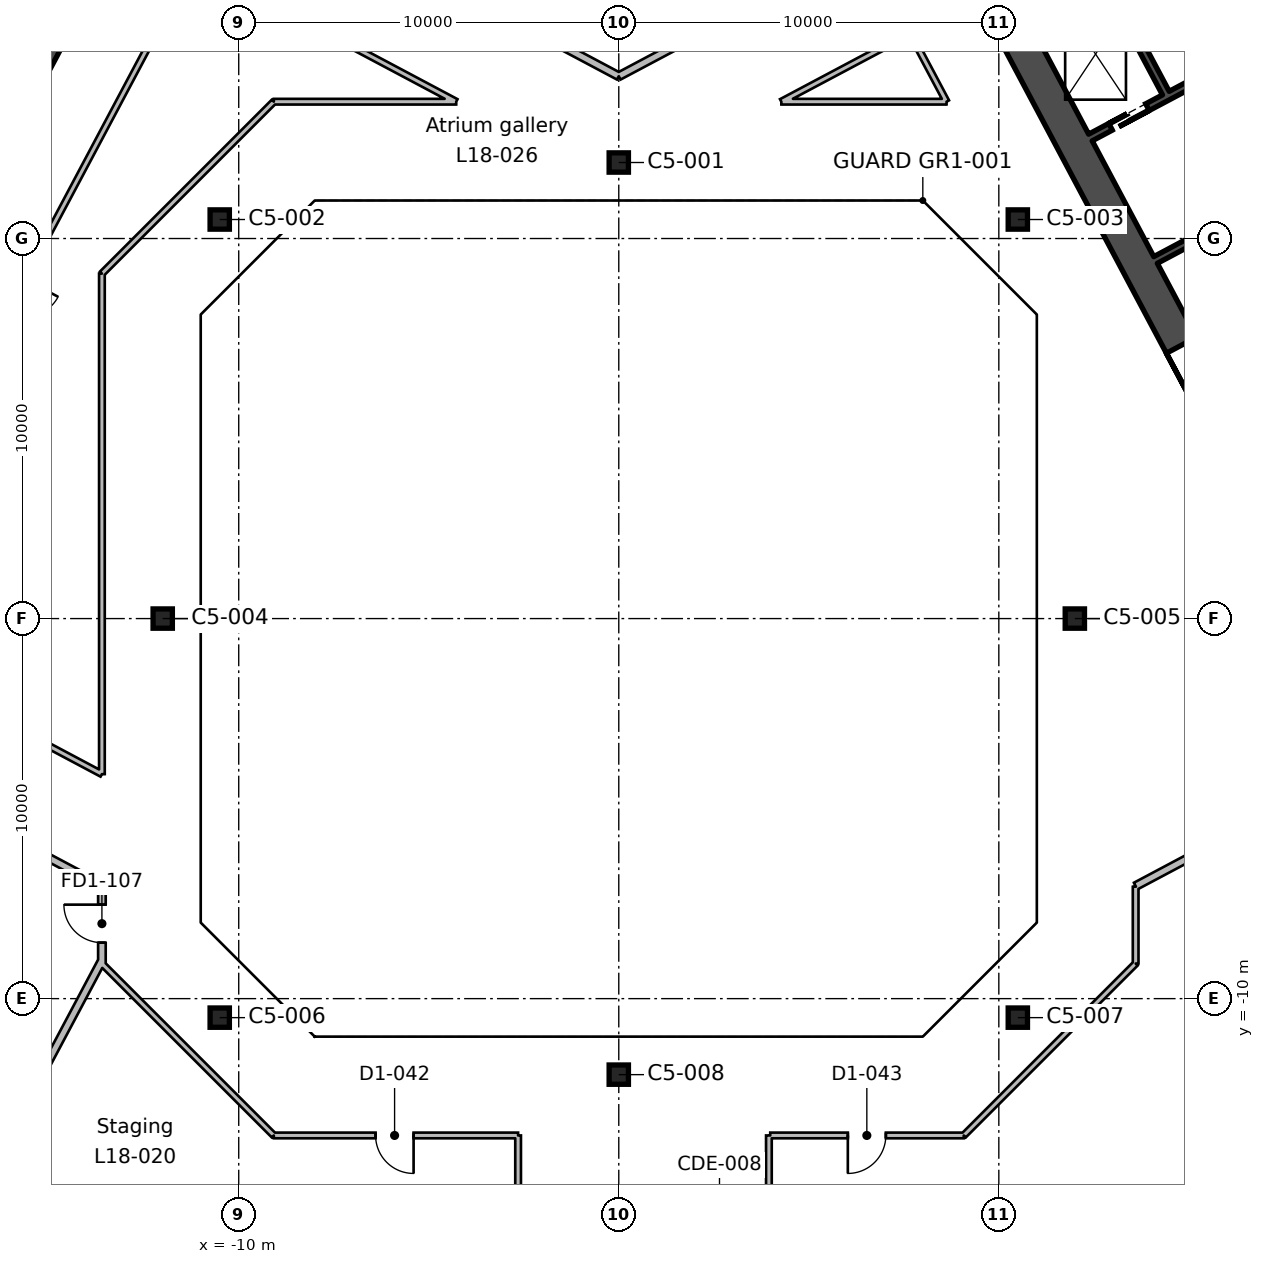
"""IFC4 building model, lengths in metres.
Left out: names, types, materials, properties, quantities, classifications, styles, units other than length and angle.
Written with IfcOpenShell. Run it as: python <this file> out.ifc"""

import sys

from ifc_helpers import new_model, si_unit, direction, frame, frame_2d, origin, origin_2d, place, context, subcontext, project, spatial, rectangle, hollow_rectangle, extrude, element, fill, save


model = new_model("IFC4")
c1 = context("Model", 3, precision=1e-05, world=origin(), true_north=direction((0.0, 1.0)))
c2 = subcontext(c1, "Body", "Model", "MODEL_VIEW")
j1 = project(units=[si_unit("LENGTHUNIT", "METRE"), si_unit("PLANEANGLEUNIT", "RADIAN")], contexts=[c1])
p1 = place(None, origin())
s1 = spatial("IfcSite", under=j1, at=p1, CompositionType="ELEMENT")
p2 = place(p1, origin())
s2 = spatial("IfcBuilding", under=s1, at=p2, CompositionType="ELEMENT")
p3 = place(p2, frame((0.0, 0.0, 93.8)))
s3 = spatial("IfcBuildingStorey", under=s2, at=p3, CompositionType="ELEMENT", Elevation=93.8)
for number, where, z_axis, x_axis in (
    (1, (0.0, -12.0, 0.0), (0.0, 0.0, 1.0), (1.0, 0.0, 0.0)),
    (2, (-10.5, -10.5, 0.0), (0.0, 0.0, 1.0), (1.0, 0.0, 0.0)),
    (3, (10.5, -10.5, 0.0), (0.0, 0.0, 1.0), (1.0, 0.0, 0.0)),
    (4, (-12.0, 0.0, 0.0), (0.0, 0.0, 1.0), (1.0, 0.0, 0.0)),
    (5, (12.0, 0.0, 0.0), (0.0, 0.0, 1.0), (1.0, 0.0, 0.0)),
    (6, (-10.5, 10.5, 0.0), (0.0, 0.0, 1.0), (1.0, 0.0, 0.0)),
    (7, (10.5, 10.5, 0.0), (0.0, 0.0, 1.0), (1.0, 0.0, 0.0)),
    (8, (0.0, 12.0, 0.0), (0.0, 0.0, 1.0), (1.0, 0.0, 0.0)),
):
    element("IfcColumn", number, at=place(p3, frame(where, z_axis=z_axis, x_axis=x_axis)), inside=s3, PredefinedType="COLUMN", context=c2, shape_type="SweptSolid", body=[
        extrude(hollow_rectangle(XDim=0.508, YDim=0.508, WallThickness=0.021, InnerFilletRadius=0.01, OuterFilletRadius=0.031, at=origin_2d()), origin(), (0.0, 0.0, 1.0), 4.6),
    ])
p4 = place(p3, frame((-13.362, 18.43, 0.0), z_axis=(0.0, 0.0, 1.0), x_axis=(-0.46947084998, -0.882947971864, 0.0)))
e9 = element("IfcWall", 9, at=p4, inside=s3, PredefinedType="SHEAR", context=c2, shape_type="SweptSolid", body=[
    extrude(rectangle(XDim=20.0, YDim=0.9, at=frame_2d((10.0, 0.0))), origin(), (0.0, 0.0, 1.0), 4.6),
])
p5 = place(p4, frame((7.0, 0.0, 0.0)))
e10 = element("IfcOpeningElement", 10, at=p5, cuts=e9, PredefinedType="OPENING", context=c2, shape_type="SweptSolid", body=[
    extrude(rectangle(XDim=2.4, YDim=2.4, at=frame_2d((1.2, 1.2))), frame((0.0, 0.46, 0.0), z_axis=(0.0, -1.0, 0.0), x_axis=(1.0, 0.0, 0.0)), (0.0, 0.0, 1.0), 0.92),
])
p6 = place(p3, frame((19.219, -1.107, 0.0), z_axis=(0.0, 0.0, 1.0), x_axis=(-0.46947084998, 0.882947971864, 0.0)))
e11 = element("IfcWall", 11, at=p6, inside=s3, PredefinedType="SHEAR", context=c2, shape_type="SweptSolid", body=[
    extrude(rectangle(XDim=20.0, YDim=0.9, at=frame_2d((10.0, 0.0))), origin(), (0.0, 0.0, 1.0), 4.6),
])
p7 = place(p6, frame((7.0, 0.0, 0.0)))
e12 = element("IfcOpeningElement", 12, at=p7, cuts=e11, PredefinedType="OPENING", context=c2, shape_type="SweptSolid", body=[
    extrude(rectangle(XDim=2.4, YDim=2.4, at=frame_2d((1.2, 1.2))), frame((0.0, 0.46, 0.0), z_axis=(0.0, -1.0, 0.0), x_axis=(1.0, 0.0, 0.0)), (0.0, 0.0, 1.0), 0.92),
])
p8 = place(p3, frame((14.394, 13.826, 0.0), z_axis=(0.0, 0.0, 1.0), x_axis=(-0.469494272526, 0.882935517501, 0.0)))
e13 = element("IfcWall", 13, at=p8, inside=s3, PredefinedType="SHEAR", context=c2, shape_type="SweptSolid", body=[
    extrude(rectangle(XDim=3.65, YDim=0.2, at=frame_2d((1.825, 0.0))), origin(), (0.0, 0.0, 1.0), 4.6),
])
p9 = place(p3, frame((18.138, 11.683, 0.0), z_axis=(0.0, 0.0, 1.0), x_axis=(-0.469480409012, 0.88294288918, 0.0)))
e14 = element("IfcWall", 14, at=p9, inside=s3, PredefinedType="SHEAR", context=c2, shape_type="SweptSolid", body=[
    extrude(rectangle(XDim=7.3, YDim=0.2, at=frame_2d((3.65, 0.0))), origin(), (0.0, 0.0, 1.0), 4.6),
])
p10 = place(p3, frame((14.124, 9.435, 0.0), z_axis=(0.0, 0.0, 1.0), x_axis=(0.882940221191, 0.469485426614, 0.0)))
e15 = element("IfcWall", 15, at=p10, inside=s3, PredefinedType="SHEAR", context=c2, shape_type="SweptSolid", body=[
    extrude(rectangle(XDim=10.0, YDim=0.2, at=frame_2d((5.0, 0.0))), origin(), (0.0, 0.0, 1.0), 4.6),
])
p11 = place(p10, frame((2.1, 0.0, 0.0)))
e16 = element("IfcOpeningElement", 16, at=p11, cuts=e15, PredefinedType="OPENING", context=c2, shape_type="SweptSolid", body=[
    extrude(rectangle(XDim=1.2, YDim=2.1, at=frame_2d((0.6, 1.05))), frame((0.0, 0.11, 0.0), z_axis=(0.0, -1.0, 0.0), x_axis=(1.0, 0.0, 0.0)), (0.0, 0.0, 1.0), 0.22),
])
p12 = place(p10, frame((5.4, 0.0, 0.0)))
e17 = element("IfcOpeningElement", 17, at=p12, cuts=e15, PredefinedType="OPENING", context=c2, shape_type="SweptSolid", body=[
    extrude(rectangle(XDim=1.1, YDim=2.1, at=frame_2d((0.55, 1.05))), frame((0.0, 0.11, 0.0), z_axis=(0.0, -1.0, 0.0), x_axis=(1.0, 0.0, 0.0)), (0.0, 0.0, 1.0), 0.22),
])
p13 = place(p10, frame((8.1, 0.0, 0.0)))
e18 = element("IfcOpeningElement", 18, at=p13, cuts=e15, PredefinedType="OPENING", context=c2, shape_type="SweptSolid", body=[
    extrude(rectangle(XDim=1.1, YDim=2.1, at=frame_2d((0.55, 1.05))), frame((0.0, 0.11, 0.0), z_axis=(0.0, -1.0, 0.0), x_axis=(1.0, 0.0, 0.0)), (0.0, 0.0, 1.0), 0.22),
])
p14 = place(p3, frame((12.41, 12.658, 0.0), z_axis=(0.0, 0.0, 1.0), x_axis=(0.8829484765, 0.469469900894, 0.0)))
e19 = element("IfcWall", 19, at=p14, inside=s3, PredefinedType="SHEAR", context=c2, shape_type="SweptSolid", body=[
    extrude(rectangle(XDim=4.5, YDim=0.2, at=frame_2d((2.25, 0.0))), origin(), (0.0, 0.0, 1.0), 4.6),
])
p15 = place(p14, frame((0.6, 0.0, 0.0)))
e20 = element("IfcOpeningElement", 20, at=p15, cuts=e19, PredefinedType="OPENING", context=c2, shape_type="SweptSolid", body=[
    extrude(rectangle(XDim=1.1, YDim=2.1, at=frame_2d((0.55, 1.05))), frame((0.0, 0.11, 0.0), z_axis=(0.0, -1.0, 0.0), x_axis=(1.0, 0.0, 0.0)), (0.0, 0.0, 1.0), 0.22),
])
p16 = place(p3, frame((-48.271, 39.936, 0.0), z_axis=(0.0, 0.0, 1.0), x_axis=(0.88294856545, -0.469469733604, 0.0)))
e21 = element("IfcWall", 21, at=p16, inside=s3, PredefinedType="PARTITIONING", context=c2, shape_type="SweptSolid", body=[
    extrude(rectangle(XDim=54.67, YDim=0.2, at=frame_2d((27.335, 0.0))), origin(), (0.0, 0.0, 1.0), 4.2),
])
p17 = place(p16, frame((27.766, 0.0, 0.0)))
e22 = element("IfcOpeningElement", 22, at=p17, cuts=e21, PredefinedType="OPENING", context=c2, shape_type="SweptSolid", body=[
    extrude(rectangle(XDim=1.0, YDim=2.1, at=frame_2d((0.5, 1.05))), frame((0.0, 0.11, 0.0), z_axis=(0.0, -1.0, 0.0), x_axis=(1.0, 0.0, 0.0)), (0.0, 0.0, 1.0), 0.22),
])
p18 = place(p16, frame((26.066, 0.0, 0.0)))
e23 = element("IfcOpeningElement", 23, at=p18, cuts=e21, PredefinedType="OPENING", context=c2, shape_type="SweptSolid", body=[
    extrude(rectangle(XDim=1.0, YDim=2.1, at=frame_2d((0.5, 1.05))), frame((0.0, 0.11, 0.0), z_axis=(0.0, -1.0, 0.0), x_axis=(1.0, 0.0, 0.0)), (0.0, 0.0, 1.0), 0.22),
])
p19 = place(p16, frame((15.265, 0.0, 0.0)))
e24 = element("IfcOpeningElement", 24, at=p19, cuts=e21, PredefinedType="OPENING", context=c2, shape_type="SweptSolid", body=[
    extrude(rectangle(XDim=1.0, YDim=2.1, at=frame_2d((0.5, 1.05))), frame((0.0, 0.11, 0.0), z_axis=(0.0, -1.0, 0.0), x_axis=(1.0, 0.0, 0.0)), (0.0, 0.0, 1.0), 0.22),
])
p20 = place(p3, frame((0.0, 14.27, 0.0), z_axis=(0.0, 0.0, 1.0), x_axis=(0.882946949892, 0.46947277203, 0.0)))
e25 = element("IfcWall", 25, at=p20, inside=s3, PredefinedType="PARTITIONING", context=c2, shape_type="SweptSolid", body=[
    extrude(rectangle(XDim=65.501, YDim=0.2, at=frame_2d((32.75, 0.0))), origin(), (0.0, 0.0, 1.0), 4.2),
])
p21 = place(p20, frame((35.45, 0.0, 0.0)))
e26 = element("IfcOpeningElement", 26, at=p21, cuts=e25, PredefinedType="OPENING", context=c2, shape_type="SweptSolid", body=[
    extrude(rectangle(XDim=1.0, YDim=2.1, at=frame_2d((0.5, 1.05))), frame((0.0, 0.11, 0.0), z_axis=(0.0, -1.0, 0.0), x_axis=(1.0, 0.0, 0.0)), (0.0, 0.0, 1.0), 0.22),
])
p22 = place(p20, frame((32.05, 0.0, 0.0)))
e27 = element("IfcOpeningElement", 27, at=p22, cuts=e25, PredefinedType="OPENING", context=c2, shape_type="SweptSolid", body=[
    extrude(rectangle(XDim=1.0, YDim=2.1, at=frame_2d((0.5, 1.05))), frame((0.0, 0.11, 0.0), z_axis=(0.0, -1.0, 0.0), x_axis=(1.0, 0.0, 0.0)), (0.0, 0.0, 1.0), 0.22),
])
p23 = place(p20, frame((29.65, 0.0, 0.0)))
e28 = element("IfcOpeningElement", 28, at=p23, cuts=e25, PredefinedType="OPENING", context=c2, shape_type="SweptSolid", body=[
    extrude(rectangle(XDim=1.0, YDim=2.1, at=frame_2d((0.5, 1.05))), frame((0.0, 0.11, 0.0), z_axis=(0.0, -1.0, 0.0), x_axis=(1.0, 0.0, 0.0)), (0.0, 0.0, 1.0), 0.22),
])
p24 = place(p20, frame((13.85, 0.0, 0.0)))
e29 = element("IfcOpeningElement", 29, at=p24, cuts=e25, PredefinedType="OPENING", context=c2, shape_type="SweptSolid", body=[
    extrude(rectangle(XDim=1.0, YDim=2.1, at=frame_2d((0.5, 1.05))), frame((0.0, 0.11, 0.0), z_axis=(0.0, -1.0, 0.0), x_axis=(1.0, 0.0, 0.0)), (0.0, 0.0, 1.0), 0.22),
])
p25 = place(p3, frame((-13.6, -9.077, 0.0), z_axis=(0.0, 0.0, 1.0), x_axis=(0.0, 1.0, 0.0)))
e30 = element("IfcWall", 30, at=p25, inside=s3, PredefinedType="PARTITIONING", context=c2, shape_type="SweptSolid", body=[
    extrude(rectangle(XDim=2.038, YDim=0.2, at=frame_2d((1.019, 0.0))), origin(), (0.0, 0.0, 1.0), 4.2),
])
p26 = place(p25, frame((0.55, 0.0, 0.0)))
e31 = element("IfcOpeningElement", 31, at=p26, cuts=e30, PredefinedType="OPENING", context=c2, shape_type="SweptSolid", body=[
    extrude(rectangle(XDim=1.0, YDim=2.1, at=frame_2d((0.5, 1.05))), frame((0.0, 0.11, 0.0), z_axis=(0.0, -1.0, 0.0), x_axis=(1.0, 0.0, 0.0)), (0.0, 0.0, 1.0), 0.22),
])
p27 = place(p3, frame((-13.6, -7.039, 0.0), z_axis=(0.0, 0.0, 1.0), x_axis=(-0.882948807105, 0.469469279113, 0.0)))
e32 = element("IfcWall", 32, at=p27, inside=s3, PredefinedType="PARTITIONING", context=c2, shape_type="SweptSolid", body=[
    extrude(rectangle(XDim=36.999, YDim=0.2, at=frame_2d((18.499, 0.0))), origin(), (0.0, 0.0, 1.0), 4.2),
])
p28 = place(p27, frame((18.05, 0.0, 0.0)))
e33 = element("IfcOpeningElement", 33, at=p28, cuts=e32, PredefinedType="OPENING", context=c2, shape_type="SweptSolid", body=[
    extrude(rectangle(XDim=1.0, YDim=2.1, at=frame_2d((0.5, 1.05))), frame((0.0, 0.11, 0.0), z_axis=(0.0, -1.0, 0.0), x_axis=(1.0, 0.0, 0.0)), (0.0, 0.0, 1.0), 0.22),
])
p29 = place(p3, frame((-13.6, -8.998, 0.0), z_axis=(0.0, 0.0, 1.0), x_axis=(-0.469531053644, -0.882915958438, 0.0)))
e34 = element("IfcWall", 34, at=p29, inside=s3, PredefinedType="PARTITIONING", context=c2, shape_type="SweptSolid", body=[
    extrude(rectangle(XDim=6.87, YDim=0.2, at=frame_2d((3.435, 0.0))), origin(), (0.0, 0.0, 1.0), 4.2),
])
p30 = place(p3, frame((-13.6, -9.077, 0.0), z_axis=(0.0, 0.0, 1.0), x_axis=(0.707106781187, -0.707106781187, 0.0)))
e35 = element("IfcWall", 35, at=p30, inside=s3, PredefinedType="PARTITIONING", context=c2, shape_type="SweptSolid", body=[
    extrude(rectangle(XDim=6.397, YDim=0.15, at=frame_2d((3.198, 0.0))), origin(), (0.0, 0.0, 1.0), 4.2),
])
p31 = place(p3, frame((-2.649, -15.84, 0.0), z_axis=(0.0, 0.0, 1.0), x_axis=(0.0, 1.0, 0.0)))
e36 = element("IfcWall", 36, at=p31, inside=s3, PredefinedType="PARTITIONING", context=c2, shape_type="SweptSolid", body=[
    extrude(rectangle(XDim=2.24, YDim=0.15, at=frame_2d((1.12, 0.0))), origin(), (0.0, 0.0, 1.0), 4.2),
])
p32 = place(p3, frame((-2.649, -13.6, 0.0), z_axis=(0.0, 0.0, 1.0), x_axis=(-1.0, 0.0, 0.0)))
e37 = element("IfcWall", 37, at=p32, inside=s3, PredefinedType="PARTITIONING", context=c2, shape_type="SweptSolid", body=[
    extrude(rectangle(XDim=6.428, YDim=0.15, at=frame_2d((3.214, 0.0))), origin(), (0.0, 0.0, 1.0), 4.2),
])
p33 = place(p32, frame((2.75, 0.0, 0.0)))
e38 = element("IfcOpeningElement", 38, at=p33, cuts=e37, PredefinedType="OPENING", context=c2, shape_type="SweptSolid", body=[
    extrude(rectangle(XDim=1.0, YDim=2.1, at=frame_2d((0.5, 1.05))), frame((0.0, 0.085, 0.0), z_axis=(0.0, -1.0, 0.0), x_axis=(1.0, 0.0, 0.0)), (0.0, 0.0, 1.0), 0.17),
])
p34 = place(p3, frame((3.95, -13.6, 0.0), z_axis=(0.0, 0.0, 1.0), x_axis=(0.0, -1.0, 0.0)))
e39 = element("IfcWall", 39, at=p34, inside=s3, PredefinedType="PARTITIONING", context=c2, shape_type="SweptSolid", body=[
    extrude(rectangle(XDim=2.24, YDim=0.15, at=frame_2d((1.12, 0.0))), origin(), (0.0, 0.0, 1.0), 4.2),
])
p35 = place(p3, frame((13.6, -7.053, 0.0), z_axis=(0.0, 0.0, 1.0), x_axis=(0.0, -1.0, 0.0)))
e40 = element("IfcWall", 40, at=p35, inside=s3, PredefinedType="PARTITIONING", context=c2, shape_type="SweptSolid", body=[
    extrude(rectangle(XDim=2.024, YDim=0.15, at=frame_2d((1.012, 0.0))), origin(), (0.0, 0.0, 1.0), 4.2),
])
p36 = place(p3, frame((13.6, -9.077, 0.0), z_axis=(0.0, 0.0, 1.0), x_axis=(-0.707106781187, -0.707106781187, 0.0)))
e41 = element("IfcWall", 41, at=p36, inside=s3, PredefinedType="PARTITIONING", context=c2, shape_type="SweptSolid", body=[
    extrude(rectangle(XDim=6.397, YDim=0.15, at=frame_2d((3.198, 0.0))), origin(), (0.0, 0.0, 1.0), 4.2),
])
p37 = place(p3, frame((9.077, -13.6, 0.0), z_axis=(0.0, 0.0, 1.0), x_axis=(-1.0, 0.0, 0.0)))
e42 = element("IfcWall", 42, at=p37, inside=s3, PredefinedType="PARTITIONING", context=c2, shape_type="SweptSolid", body=[
    extrude(rectangle(XDim=5.092, YDim=0.15, at=frame_2d((2.546, 0.0))), origin(), (0.0, 0.0, 1.0), 4.2),
])
p38 = place(p37, frame((2.05, 0.0, 0.0)))
e43 = element("IfcOpeningElement", 43, at=p38, cuts=e42, PredefinedType="OPENING", context=c2, shape_type="SweptSolid", body=[
    extrude(rectangle(XDim=1.0, YDim=2.1, at=frame_2d((0.5, 1.05))), frame((0.0, 0.085, 0.0), z_axis=(0.0, -1.0, 0.0), x_axis=(1.0, 0.0, 0.0)), (0.0, 0.0, 1.0), 0.17),
])
p39 = place(p3, frame((57.105, 16.093, 0.0), z_axis=(0.0, 0.0, 1.0), x_axis=(-0.882946553343, -0.469473517827, 0.0)))
e44 = element("IfcWall", 44, at=p39, inside=s3, PredefinedType="PARTITIONING", context=c2, shape_type="SweptSolid", body=[
    extrude(rectangle(XDim=49.272, YDim=0.2, at=frame_2d((24.636, 0.0))), origin(), (0.0, 0.0, 1.0), 4.2),
])
p40 = place(p39, frame((27.75, 0.0, 0.0)))
e45 = element("IfcOpeningElement", 45, at=p40, cuts=e44, PredefinedType="OPENING", context=c2, shape_type="SweptSolid", body=[
    extrude(rectangle(XDim=1.0, YDim=2.1, at=frame_2d((0.5, 1.05))), frame((0.0, 0.11, 0.0), z_axis=(0.0, -1.0, 0.0), x_axis=(1.0, 0.0, 0.0)), (0.0, 0.0, 1.0), 0.22),
])
p41 = place(p39, frame((24.15, 0.0, 0.0)))
e46 = element("IfcOpeningElement", 46, at=p41, cuts=e44, PredefinedType="OPENING", context=c2, shape_type="SweptSolid", body=[
    extrude(rectangle(XDim=1.0, YDim=2.1, at=frame_2d((0.5, 1.05))), frame((0.0, 0.11, 0.0), z_axis=(0.0, -1.0, 0.0), x_axis=(1.0, 0.0, 0.0)), (0.0, 0.0, 1.0), 0.22),
])
p42 = place(p39, frame((9.85, 0.0, 0.0)))
e47 = element("IfcOpeningElement", 47, at=p42, cuts=e44, PredefinedType="OPENING", context=c2, shape_type="SweptSolid", body=[
    extrude(rectangle(XDim=1.0, YDim=2.1, at=frame_2d((0.5, 1.05))), frame((0.0, 0.11, 0.0), z_axis=(0.0, -1.0, 0.0), x_axis=(1.0, 0.0, 0.0)), (0.0, 0.0, 1.0), 0.22),
])
p43 = place(p3, frame((-20.588, -0.379, 0.0), z_axis=(0.0, 0.0, 1.0), x_axis=(0.469489882812, 0.882937851685, 0.0)))
e48 = element("IfcWall", 48, at=p43, inside=s3, PredefinedType="PARTITIONING", context=c2, shape_type="SweptSolid", body=[
    extrude(rectangle(XDim=20.0, YDim=0.15, at=frame_2d((10.0, 0.0))), origin(), (0.0, 0.0, 1.0), 4.2),
])
p44 = place(p43, frame((9.55, 0.0, 0.0)))
e49 = element("IfcOpeningElement", 49, at=p44, cuts=e48, PredefinedType="OPENING", context=c2, shape_type="SweptSolid", body=[
    extrude(rectangle(XDim=1.0, YDim=2.1, at=frame_2d((0.5, 1.05))), frame((0.0, 0.085, 0.0), z_axis=(0.0, -1.0, 0.0), x_axis=(1.0, 0.0, 0.0)), (0.0, 0.0, 1.0), 0.17),
])
p45 = place(p3, frame((-11.198, 17.28, 0.0), z_axis=(0.0, 0.0, 1.0), x_axis=(0.882946288452, -0.46947401601, 0.0)))
e50 = element("IfcWall", 50, at=p45, inside=s3, PredefinedType="PARTITIONING", context=c2, shape_type="SweptSolid", body=[
    extrude(rectangle(XDim=7.838, YDim=0.15, at=frame_2d((3.919, 0.0))), origin(), (0.0, 0.0, 1.0), 4.2),
])
p46 = place(p3, frame((-4.277, 13.6, 0.0), z_axis=(0.0, 0.0, 1.0), x_axis=(-1.0, 0.0, 0.0)))
e51 = element("IfcWall", 51, at=p46, inside=s3, PredefinedType="PARTITIONING", context=c2, shape_type="SweptSolid", body=[
    extrude(rectangle(XDim=4.8, YDim=0.15, at=frame_2d((2.4, 0.0))), origin(), (0.0, 0.0, 1.0), 4.2),
])
p47 = place(p3, frame((-9.077, 13.6, 0.0), z_axis=(0.0, 0.0, 1.0), x_axis=(-0.707106781187, -0.707106781187, 0.0)))
e52 = element("IfcWall", 52, at=p47, inside=s3, PredefinedType="PARTITIONING", context=c2, shape_type="SweptSolid", body=[
    extrude(rectangle(XDim=6.397, YDim=0.15, at=frame_2d((3.198, 0.0))), origin(), (0.0, 0.0, 1.0), 4.2),
])
p48 = place(p3, frame((-13.6, 9.077, 0.0), z_axis=(0.0, 0.0, 1.0), x_axis=(0.0, -1.0, 0.0)))
e53 = element("IfcWall", 53, at=p48, inside=s3, PredefinedType="PARTITIONING", context=c2, shape_type="SweptSolid", body=[
    extrude(rectangle(XDim=13.171, YDim=0.15, at=frame_2d((6.585, 0.0))), origin(), (0.0, 0.0, 1.0), 4.2),
])
p49 = place(p3, frame((-13.6, -4.094, 0.0), z_axis=(0.0, 0.0, 1.0), x_axis=(-0.882967890474, 0.469433386533, 0.0)))
e54 = element("IfcWall", 54, at=p49, inside=s3, PredefinedType="PARTITIONING", context=c2, shape_type="SweptSolid", body=[
    extrude(rectangle(XDim=7.914, YDim=0.15, at=frame_2d((3.957, 0.0))), origin(), (0.0, 0.0, 1.0), 4.2),
])
p50 = place(p3, frame((4.277, 13.6, 0.0), z_axis=(0.0, 0.0, 1.0), x_axis=(1.0, 0.0, 0.0)))
e55 = element("IfcWall", 55, at=p50, inside=s3, PredefinedType="PARTITIONING", context=c2, shape_type="SweptSolid", body=[
    extrude(rectangle(XDim=4.348, YDim=0.15, at=frame_2d((2.174, 0.0))), origin(), (0.0, 0.0, 1.0), 4.2),
])
p51 = place(p3, frame((8.625, 13.6, 0.0), z_axis=(0.0, 0.0, 1.0), x_axis=(-0.469420518513, 0.882974731688, 0.0)))
e56 = element("IfcWall", 56, at=p51, inside=s3, PredefinedType="PARTITIONING", context=c2, shape_type="SweptSolid", body=[
    extrude(rectangle(XDim=2.041, YDim=0.15, at=frame_2d((1.021, 0.0))), origin(), (0.0, 0.0, 1.0), 4.2),
])
p52 = place(p3, frame((7.667, 15.402, 0.0), z_axis=(0.0, 0.0, 1.0), x_axis=(-0.882994654303, -0.469383042378, 0.0)))
e57 = element("IfcWall", 57, at=p52, inside=s3, PredefinedType="PARTITIONING", context=c2, shape_type="SweptSolid", body=[
    extrude(rectangle(XDim=3.839, YDim=0.15, at=frame_2d((1.919, 0.0))), origin(), (0.0, 0.0, 1.0), 4.2),
])
p53 = place(p7, frame((2.4, 0.0, 0.0), z_axis=(0.0, 0.0, 1.0), x_axis=(-1.0, 0.0, 0.0)))
e58 = element("IfcDoor", 58, at=p53, inside=s3, OperationType="DOUBLE_DOOR_SINGLE_SWING", PredefinedType="DOOR", context=c2, shape_type="SweptSolid", body=[
    extrude(rectangle(XDim=2.4, YDim=2.4, at=frame_2d((1.2, 1.2))), frame((0.0, 0.025, 0.0), z_axis=(0.0, -1.0, 0.0), x_axis=(1.0, 0.0, 0.0)), (0.0, 0.0, 1.0), 0.05),
])
fill(e12, e58)
p54 = place(p15, origin())
e59 = element("IfcDoor", 59, at=p54, inside=s3, OperationType="DOUBLE_DOOR_SLIDING", PredefinedType="DOOR", context=c2, shape_type="SweptSolid", body=[
    extrude(rectangle(XDim=1.1, YDim=2.1, at=frame_2d((0.55, 1.05))), frame((0.0, 0.025, 0.0), z_axis=(0.0, -1.0, 0.0), x_axis=(1.0, 0.0, 0.0)), (0.0, 0.0, 1.0), 0.05),
])
fill(e20, e59)
p55 = place(p38, origin())
e60 = element("IfcDoor", 60, at=p55, inside=s3, OperationType="SINGLE_SWING_RIGHT", PredefinedType="DOOR", context=c2, shape_type="SweptSolid", body=[
    extrude(rectangle(XDim=1.0, YDim=2.1, at=frame_2d((0.5, 1.05))), frame((0.0, 0.025, 0.0), z_axis=(0.0, -1.0, 0.0), x_axis=(1.0, 0.0, 0.0)), (0.0, 0.0, 1.0), 0.05),
])
fill(e43, e60)
p56 = place(p26, origin())
e61 = element("IfcDoor", 61, at=p56, inside=s3, OperationType="SINGLE_SWING_RIGHT", PredefinedType="DOOR", context=c2, shape_type="SweptSolid", body=[
    extrude(rectangle(XDim=1.0, YDim=2.1, at=frame_2d((0.5, 1.05))), frame((0.0, 0.025, 0.0), z_axis=(0.0, -1.0, 0.0), x_axis=(1.0, 0.0, 0.0)), (0.0, 0.0, 1.0), 0.05),
])
fill(e31, e61)
p57 = place(p33, origin())
e62 = element("IfcDoor", 62, at=p57, inside=s3, OperationType="SINGLE_SWING_LEFT", PredefinedType="DOOR", context=c2, shape_type="SweptSolid", body=[
    extrude(rectangle(XDim=1.0, YDim=2.1, at=frame_2d((0.5, 1.05))), frame((0.0, 0.025, 0.0), z_axis=(0.0, -1.0, 0.0), x_axis=(1.0, 0.0, 0.0)), (0.0, 0.0, 1.0), 0.05),
])
fill(e38, e62)
save(model, sys.argv[1])
